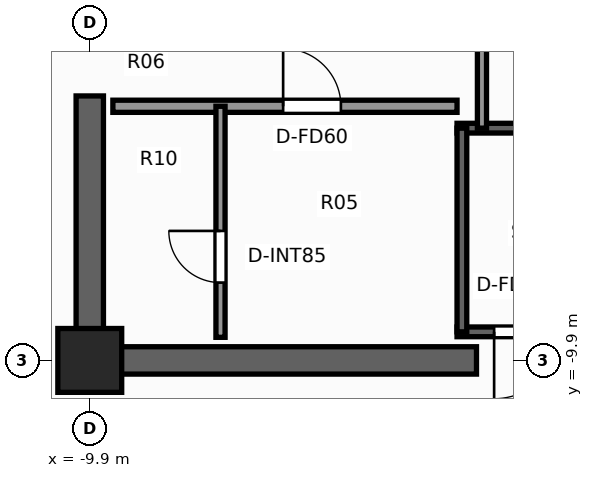
"""IFC4 building model, lengths in metres.
Left out: names, types, materials, properties, quantities, classifications, styles, units other than length and angle.
Written with IfcOpenShell. Run it as: python <this file> out.ifc"""

import sys

from ifc_helpers import new_model, si_unit, direction, frame, frame_2d, origin, origin_2d, place, context, subcontext, project, spatial, rectangle, extrude, element, fill, save


model = new_model("IFC4")
c1 = context("Model", 3, precision=1e-05, world=origin(), true_north=direction((0.0, 1.0)))
c2 = subcontext(c1, "Body", "Model", "MODEL_VIEW")
j1 = project(units=[si_unit("LENGTHUNIT", "METRE"), si_unit("PLANEANGLEUNIT", "RADIAN")], contexts=[c1])
p1 = place(None, origin())
s1 = spatial("IfcSite", under=j1, at=p1, CompositionType="ELEMENT")
p2 = place(p1, origin())
s2 = spatial("IfcBuilding", under=s1, at=p2, CompositionType="ELEMENT")
p3 = place(p2, frame((0.0, 0.0, 213.0)))
s3 = spatial("IfcBuildingStorey", under=s2, at=p3, CompositionType="ELEMENT", Elevation=213.0)
p4 = place(p3, frame((-3.54, -9.9, 0.0), z_axis=(0.0, 0.0, 1.0), x_axis=(-1.0, 0.0, 0.0)))
e1 = element("IfcWall", 1, at=p4, inside=s3, PredefinedType="SHEAR", context=c2, shape_type="SweptSolid", body=[
    extrude(rectangle(XDim=6.585, YDim=0.45, at=frame_2d((3.292, 0.0))), origin(), (0.0, 0.0, 1.0), 3.3),
])
p5 = place(p3, frame((-9.9, -9.675, 0.0), z_axis=(0.0, 0.0, 1.0), x_axis=(0.0, 1.0, 0.0)))
e2 = element("IfcWall", 2, at=p5, inside=s3, PredefinedType="SHEAR", context=c2, shape_type="SweptSolid", body=[
    extrude(rectangle(XDim=4.125, YDim=0.45, at=frame_2d((2.062, 0.0))), origin(), (0.0, 0.0, 1.0), 3.3),
])
p6 = place(p3, frame((-9.9, -9.9, 0.0), z_axis=(0.0, 0.0, 1.0), x_axis=(1.0, 0.0, 0.0)))
e3 = element("IfcColumn", 3, at=p6, inside=s3, PredefinedType="COLUMN", context=c2, shape_type="SweptSolid", body=[
    extrude(rectangle(XDim=1.05, YDim=1.05, at=origin_2d()), origin(), (0.0, 0.0, 1.0), 3.3),
])
p7 = place(p3, frame((3.86, -9.43, 0.0), z_axis=(0.0, 0.0, 1.0), x_axis=(-1.0, 0.0, 0.0)))
e4 = element("IfcWall", 4, at=p7, inside=s3, PredefinedType="SHEAR", context=c2, shape_type="SweptSolid", body=[
    extrude(rectangle(XDim=7.72, YDim=0.16, at=frame_2d((3.86, 0.0))), origin(), (0.0, 0.0, 1.0), 3.3),
])
p8 = place(p7, frame((6.01, 0.0, 0.0)))
e5 = element("IfcOpeningElement", 5, at=p8, cuts=e4, PredefinedType="OPENING", context=c2, shape_type="SweptSolid", body=[
    extrude(rectangle(XDim=1.1, YDim=2.2, at=frame_2d((0.55, 1.1))), frame((0.0, 0.09, 0.0), z_axis=(0.0, -1.0, 0.0), x_axis=(1.0, 0.0, 0.0)), (0.0, 0.0, 1.0), 0.18),
])
p9 = place(p3, frame((-3.86, -6.08, 0.0), z_axis=(0.0, 0.0, 1.0), x_axis=(1.0, 0.0, 0.0)))
e6 = element("IfcWall", 6, at=p9, inside=s3, PredefinedType="SHEAR", context=c2, shape_type="SweptSolid", body=[
    extrude(rectangle(XDim=7.72, YDim=0.16, at=frame_2d((3.86, 0.0))), origin(), (0.0, 0.0, 1.0), 3.3),
])
p10 = place(p3, frame((-3.78, -9.43, 0.0), z_axis=(0.0, 0.0, 1.0), x_axis=(0.0, 1.0, 0.0)))
e7 = element("IfcWall", 7, at=p10, inside=s3, PredefinedType="SHEAR", context=c2, shape_type="SweptSolid", body=[
    extrude(rectangle(XDim=3.35, YDim=0.16, at=frame_2d((1.675, 0.0))), origin(), (0.0, 0.0, 1.0), 3.3),
])
p11 = place(p3, frame((-9.52, -5.72, 0.0), z_axis=(0.0, 0.0, 1.0), x_axis=(1.0, 0.0, 0.0)))
e8 = element("IfcWall", 8, at=p11, inside=s3, PredefinedType="SOLIDWALL", context=c2, shape_type="SweptSolid", body=[
    extrude(rectangle(XDim=5.66, YDim=0.2, at=frame_2d((2.83, 0.0))), origin(), (0.0, 0.0, 1.0), 3.08),
])
p12 = place(p11, frame((2.8, 0.0, 0.0)))
e9 = element("IfcOpeningElement", 9, at=p12, cuts=e8, PredefinedType="OPENING", context=c2, shape_type="SweptSolid", body=[
    extrude(rectangle(XDim=0.95, YDim=2.06, at=frame_2d((0.475, 1.03))), frame((0.0, 0.11, 0.0), z_axis=(0.0, -1.0, 0.0), x_axis=(1.0, 0.0, 0.0)), (0.0, 0.0, 1.0), 0.22),
])
p13 = place(p3, frame((-7.75, -9.52, 0.0), z_axis=(0.0, 0.0, 1.0), x_axis=(0.0, 1.0, 0.0)))
e10 = element("IfcWall", 10, at=p13, inside=s3, PredefinedType="PARTITIONING", context=c2, shape_type="SweptSolid", body=[
    extrude(rectangle(XDim=3.8, YDim=0.15, at=frame_2d((1.9, 0.0))), origin(), (0.0, 0.0, 1.0), 3.08),
])
p14 = place(p13, frame((0.9, 0.0, 0.0)))
e11 = element("IfcOpeningElement", 11, at=p14, cuts=e10, PredefinedType="OPENING", context=c2, shape_type="SweptSolid", body=[
    extrude(rectangle(XDim=0.85, YDim=2.03, at=frame_2d((0.425, 1.015))), frame((0.0, 0.085, 0.0), z_axis=(0.0, -1.0, 0.0), x_axis=(1.0, 0.0, 0.0)), (0.0, 0.0, 1.0), 0.17),
])
p15 = place(p3, frame((-3.45, -6.08, 0.0), z_axis=(0.0, 0.0, 1.0), x_axis=(0.0, 1.0, 0.0)))
e12 = element("IfcWall", 12, at=p15, inside=s3, PredefinedType="PARTITIONING", context=c2, shape_type="SweptSolid", body=[
    extrude(rectangle(XDim=2.36, YDim=0.15, at=frame_2d((1.18, 0.0))), origin(), (0.0, 0.0, 1.0), 3.08),
])
p16 = place(p8, origin())
e13 = element("IfcDoor", 13, at=p16, inside=s3, OperationType="SINGLE_SWING_RIGHT", PredefinedType="DOOR", context=c2, shape_type="SweptSolid", body=[
    extrude(rectangle(XDim=1.1, YDim=2.2, at=frame_2d((0.55, 1.1))), frame((0.0, 0.025, 0.0), z_axis=(0.0, -1.0, 0.0), x_axis=(1.0, 0.0, 0.0)), (0.0, 0.0, 1.0), 0.05),
])
fill(e5, e13)
p17 = place(p12, origin())
e14 = element("IfcDoor", 14, at=p17, inside=s3, OperationType="SINGLE_SWING_LEFT", PredefinedType="DOOR", context=c2, shape_type="SweptSolid", body=[
    extrude(rectangle(XDim=0.95, YDim=2.06, at=frame_2d((0.475, 1.03))), frame((0.0, 0.025, 0.0), z_axis=(0.0, -1.0, 0.0), x_axis=(1.0, 0.0, 0.0)), (0.0, 0.0, 1.0), 0.05),
])
fill(e9, e14)
p18 = place(p14, origin())
e15 = element("IfcDoor", 15, at=p18, inside=s3, OperationType="SINGLE_SWING_RIGHT", PredefinedType="DOOR", context=c2, shape_type="SweptSolid", body=[
    extrude(rectangle(XDim=0.85, YDim=2.03, at=frame_2d((0.425, 1.015))), frame((0.0, 0.025, 0.0), z_axis=(0.0, -1.0, 0.0), x_axis=(1.0, 0.0, 0.0)), (0.0, 0.0, 1.0), 0.05),
])
fill(e11, e15)
save(model, sys.argv[1])
